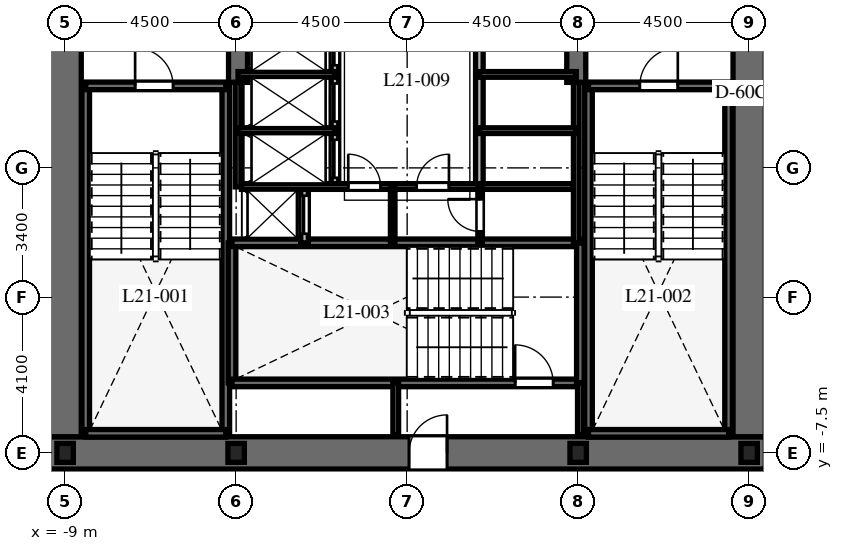
"""IFC4 building model, lengths in metres.
Left out: names, types, materials, properties, quantities, classifications, styles, units other than length and angle.
Written with IfcOpenShell. Run it as: python <this file> out.ifc"""

import sys

from ifc_helpers import new_model, si_unit, direction, frame, frame_2d, origin, origin_2d, place, context, subcontext, project, spatial, rectangle, i_section, extrude, element, fill, save


model = new_model("IFC4")
c1 = context("Model", 3, precision=1e-05, world=origin(), true_north=direction((0.0, 1.0)))
c2 = subcontext(c1, "Body", "Model", "MODEL_VIEW")
j1 = project(units=[si_unit("LENGTHUNIT", "METRE"), si_unit("PLANEANGLEUNIT", "RADIAN")], contexts=[c1])
p1 = place(None, origin())
s1 = spatial("IfcSite", under=j1, at=p1, CompositionType="ELEMENT")
p2 = place(p1, origin())
s2 = spatial("IfcBuilding", under=s1, at=p2, CompositionType="ELEMENT")
p3 = place(p2, frame((0.0, 0.0, 91.4)))
s3 = spatial("IfcBuildingStorey", under=s2, at=p3, CompositionType="ELEMENT", Elevation=91.4)
p4 = place(p3, frame((-9.425, -7.5, 0.0), z_axis=(0.0, 0.0, 1.0), x_axis=(1.0, 0.0, 0.0)))
e1 = element("IfcWall", 1, at=p4, inside=s3, PredefinedType="SHEAR", context=c2, shape_type="SweptSolid", body=[
    extrude(rectangle(XDim=18.85, YDim=0.85, at=frame_2d((9.425, 0.0))), origin(), (0.0, 0.0, 1.0), 3.7),
])
p5 = place(p4, frame((9.475, 0.0, 0.0)))
e2 = element("IfcOpeningElement", 2, at=p5, cuts=e1, PredefinedType="OPENING", context=c2, shape_type="SweptSolid", body=[
    extrude(rectangle(XDim=1.0, YDim=2.15, at=frame_2d((0.5, 1.075))), frame((0.0, 0.435, 0.0), z_axis=(0.0, -1.0, 0.0), x_axis=(1.0, 0.0, 0.0)), (0.0, 0.0, 1.0), 0.87),
])
p6 = place(p3, frame((-9.0, -7.075, 0.0), z_axis=(0.0, 0.0, 1.0), x_axis=(0.0, 1.0, 0.0)))
e3 = element("IfcWall", 3, at=p6, inside=s3, PredefinedType="SHEAR", context=c2, shape_type="SweptSolid", body=[
    extrude(rectangle(XDim=14.15, YDim=0.85, at=frame_2d((7.075, 0.0))), origin(), (0.0, 0.0, 1.0), 3.7),
])
p7 = place(p6, frame((10.2, 0.0, 0.0)))
e4 = element("IfcOpeningElement", 4, at=p7, cuts=e3, PredefinedType="OPENING", context=c2, shape_type="SweptSolid", body=[
    extrude(rectangle(XDim=1.05, YDim=2.15, at=frame_2d((0.525, 1.075))), frame((0.0, 0.435, 0.0), z_axis=(0.0, -1.0, 0.0), x_axis=(1.0, 0.0, 0.0)), (0.0, 0.0, 1.0), 0.87),
])
p8 = place(p3, frame((9.0, -7.075, 0.0), z_axis=(0.0, 0.0, 1.0), x_axis=(0.0, 1.0, 0.0)))
e5 = element("IfcWall", 5, at=p8, inside=s3, PredefinedType="SHEAR", context=c2, shape_type="SweptSolid", body=[
    extrude(rectangle(XDim=14.15, YDim=0.85, at=frame_2d((7.075, 0.0))), origin(), (0.0, 0.0, 1.0), 3.7),
])
p9 = place(p8, frame((10.2, 0.0, 0.0)))
e6 = element("IfcOpeningElement", 6, at=p9, cuts=e5, PredefinedType="OPENING", context=c2, shape_type="SweptSolid", body=[
    extrude(rectangle(XDim=1.05, YDim=2.15, at=frame_2d((0.525, 1.075))), frame((0.0, 0.435, 0.0), z_axis=(0.0, -1.0, 0.0), x_axis=(1.0, 0.0, 0.0)), (0.0, 0.0, 1.0), 0.87),
])
for number, where, z_axis, x_axis in (
    (7, (-4.45, 2.25, 0.0), (0.0, 0.0, 1.0), (0.0, 1.0, 0.0)),
    (8, (4.45, 2.25, 0.0), (0.0, 0.0, 1.0), (0.0, 1.0, 0.0)),
):
    element("IfcWall", number, at=place(p3, frame(where, z_axis=z_axis, x_axis=x_axis)), inside=s3, PredefinedType="SHEAR", context=c2, shape_type="SweptSolid", body=[
        extrude(rectangle(XDim=4.825, YDim=0.5, at=frame_2d((2.413, 0.0))), origin(), (0.0, 0.0, 1.0), 3.7),
    ])
for number, where, z_axis, x_axis in (
    (9, (-8.458, -6.985, 0.0), (0.0, 0.0, 1.0), (0.0, 1.0, 0.0)),
    (10, (-4.772, -6.985, 0.0), (0.0, 0.0, 1.0), (0.0, 1.0, 0.0)),
):
    element("IfcWall", number, at=place(p3, frame(where, z_axis=z_axis, x_axis=x_axis)), inside=s3, PredefinedType="SHEAR", context=c2, shape_type="SweptSolid", body=[
        extrude(rectangle(XDim=9.143, YDim=0.2, at=frame_2d((4.572, 0.0))), origin(), (0.0, 0.0, 1.0), 3.7),
    ])
p10 = place(p3, frame((-8.458, -6.985, 0.0), z_axis=(0.0, 0.0, 1.0), x_axis=(1.0, 0.0, 0.0)))
e11 = element("IfcWall", 11, at=p10, inside=s3, PredefinedType="SHEAR", context=c2, shape_type="SweptSolid", body=[
    extrude(rectangle(XDim=3.686, YDim=0.2, at=frame_2d((1.843, 0.0))), origin(), (0.0, 0.0, 1.0), 3.7),
])
p11 = place(p3, frame((-8.458, 2.158, 0.0), z_axis=(0.0, 0.0, 1.0), x_axis=(1.0, 0.0, 0.0)))
e12 = element("IfcWall", 12, at=p11, inside=s3, PredefinedType="SHEAR", context=c2, shape_type="SweptSolid", body=[
    extrude(rectangle(XDim=3.686, YDim=0.2, at=frame_2d((1.843, 0.0))), origin(), (0.0, 0.0, 1.0), 3.7),
])
p12 = place(p11, frame((1.3, 0.0, 0.0)))
e13 = element("IfcOpeningElement", 13, at=p12, cuts=e12, PredefinedType="OPENING", context=c2, shape_type="SweptSolid", body=[
    extrude(rectangle(XDim=1.0, YDim=2.15, at=frame_2d((0.5, 1.075))), frame((0.0, 0.11, 0.0), z_axis=(0.0, -1.0, 0.0), x_axis=(1.0, 0.0, 0.0)), (0.0, 0.0, 1.0), 0.22),
])
for number, where, z_axis, x_axis in (
    (14, (4.772, -6.985, 0.0), (0.0, 0.0, 1.0), (0.0, 1.0, 0.0)),
    (15, (8.458, -6.985, 0.0), (0.0, 0.0, 1.0), (0.0, 1.0, 0.0)),
):
    element("IfcWall", number, at=place(p3, frame(where, z_axis=z_axis, x_axis=x_axis)), inside=s3, PredefinedType="SHEAR", context=c2, shape_type="SweptSolid", body=[
        extrude(rectangle(XDim=9.143, YDim=0.2, at=frame_2d((4.572, 0.0))), origin(), (0.0, 0.0, 1.0), 3.7),
    ])
p13 = place(p3, frame((4.772, -6.985, 0.0), z_axis=(0.0, 0.0, 1.0), x_axis=(1.0, 0.0, 0.0)))
e16 = element("IfcWall", 16, at=p13, inside=s3, PredefinedType="SHEAR", context=c2, shape_type="SweptSolid", body=[
    extrude(rectangle(XDim=3.686, YDim=0.2, at=frame_2d((1.843, 0.0))), origin(), (0.0, 0.0, 1.0), 3.7),
])
p14 = place(p3, frame((4.772, 2.158, 0.0), z_axis=(0.0, 0.0, 1.0), x_axis=(1.0, 0.0, 0.0)))
e17 = element("IfcWall", 17, at=p14, inside=s3, PredefinedType="SHEAR", context=c2, shape_type="SweptSolid", body=[
    extrude(rectangle(XDim=3.686, YDim=0.2, at=frame_2d((1.843, 0.0))), origin(), (0.0, 0.0, 1.0), 3.7),
])
p15 = place(p14, frame((1.35, 0.0, 0.0)))
e18 = element("IfcOpeningElement", 18, at=p15, cuts=e17, PredefinedType="OPENING", context=c2, shape_type="SweptSolid", body=[
    extrude(rectangle(XDim=1.0, YDim=2.15, at=frame_2d((0.5, 1.075))), frame((0.0, 0.11, 0.0), z_axis=(0.0, -1.0, 0.0), x_axis=(1.0, 0.0, 0.0)), (0.0, 0.0, 1.0), 0.22),
])
p16 = place(p3, frame((-4.608, -5.658, 0.0), z_axis=(0.0, 0.0, 1.0), x_axis=(0.0, 1.0, 0.0)))
e19 = element("IfcWall", 19, at=p16, inside=s3, PredefinedType="SHEAR", context=c2, shape_type="SweptSolid", body=[
    extrude(rectangle(XDim=3.686, YDim=0.2, at=frame_2d((1.843, 0.0))), origin(), (0.0, 0.0, 1.0), 3.7),
])
p17 = place(p3, frame((-4.608, -5.658, 0.0), z_axis=(0.0, 0.0, 1.0), x_axis=(1.0, 0.0, 0.0)))
e20 = element("IfcWall", 20, at=p17, inside=s3, PredefinedType="SHEAR", context=c2, shape_type="SweptSolid", body=[
    extrude(rectangle(XDim=9.166, YDim=0.2, at=frame_2d((4.583, 0.0))), origin(), (0.0, 0.0, 1.0), 3.7),
])
p18 = place(p17, frame((7.45, 0.0, 0.0)))
e21 = element("IfcOpeningElement", 21, at=p18, cuts=e20, PredefinedType="OPENING", context=c2, shape_type="SweptSolid", body=[
    extrude(rectangle(XDim=1.0, YDim=2.15, at=frame_2d((0.5, 1.075))), frame((0.0, 0.11, 0.0), z_axis=(0.0, -1.0, 0.0), x_axis=(1.0, 0.0, 0.0)), (0.0, 0.0, 1.0), 0.22),
])
p19 = place(p3, frame((-4.608, -1.972, 0.0), z_axis=(0.0, 0.0, 1.0), x_axis=(1.0, 0.0, 0.0)))
e22 = element("IfcWall", 22, at=p19, inside=s3, PredefinedType="SHEAR", context=c2, shape_type="SweptSolid", body=[
    extrude(rectangle(XDim=9.166, YDim=0.2, at=frame_2d((4.583, 0.0))), origin(), (0.0, 0.0, 1.0), 3.7),
])
p20 = place(p3, frame((4.558, -5.658, 0.0), z_axis=(0.0, 0.0, 1.0), x_axis=(0.0, 1.0, 0.0)))
e23 = element("IfcWall", 23, at=p20, inside=s3, PredefinedType="SHEAR", context=c2, shape_type="SweptSolid", body=[
    extrude(rectangle(XDim=3.686, YDim=0.2, at=frame_2d((1.843, 0.0))), origin(), (0.0, 0.0, 1.0), 3.7),
])
for number, where, z_axis, x_axis in (
    (24, (-9.0, -7.5, 0.0), (0.0, 0.0, 1.0), (1.0, 0.0, 0.0)),
    (25, (-4.5, -7.5, 0.0), (0.0, 0.0, 1.0), (1.0, 0.0, 0.0)),
    (26, (4.5, -7.5, 0.0), (0.0, 0.0, 1.0), (1.0, 0.0, 0.0)),
    (27, (9.0, -7.5, 0.0), (0.0, 0.0, 1.0), (1.0, 0.0, 0.0)),
):
    element("IfcColumn", number, at=place(p3, frame(where, z_axis=z_axis, x_axis=x_axis)), inside=s3, PredefinedType="COLUMN", context=c2, shape_type="SweptSolid", body=[
        extrude(i_section(OverallWidth=0.432, OverallDepth=0.498, WebThickness=0.056, FlangeThickness=0.089, at=origin_2d()), origin(), (0.0, 0.0, 1.0), 3.7),
    ])
for number, where, z_axis, x_axis in (
    (28, (-0.3, -7.02, 0.0), (0.0, 0.0, 1.0), (0.0, 1.0, 0.0)),
    (29, (4.558, -7.02, 0.0), (0.0, 0.0, 1.0), (0.0, 1.0, 0.0)),
):
    element("IfcWall", number, at=place(p3, frame(where, z_axis=z_axis, x_axis=x_axis)), inside=s3, PredefinedType="PARTITIONING", context=c2, shape_type="SweptSolid", body=[
        extrude(rectangle(XDim=1.362, YDim=0.15, at=frame_2d((0.681, 0.0))), origin(), (0.0, 0.0, 1.0), 3.4),
    ])
p21 = place(p3, frame((-2.7, -1.972, 0.0), z_axis=(0.0, 0.0, 1.0), x_axis=(0.0, 1.0, 0.0)))
e30 = element("IfcWall", 30, at=p21, inside=s3, PredefinedType="PARTITIONING", context=c2, shape_type="SweptSolid", body=[
    extrude(rectangle(XDim=1.472, YDim=0.2, at=frame_2d((0.736, 0.0))), origin(), (0.0, 0.0, 1.0), 3.4),
])
p22 = place(p21, frame((0.24, 0.0, 0.0)))
e31 = element("IfcOpeningElement", 31, at=p22, cuts=e30, PredefinedType="OPENING", context=c2, shape_type="SweptSolid", body=[
    extrude(rectangle(XDim=1.0, YDim=2.2, at=frame_2d((0.5, 1.1))), frame((0.0, 0.11, 0.0), z_axis=(0.0, -1.0, 0.0), x_axis=(1.0, 0.0, 0.0)), (0.0, 0.0, 1.0), 0.22),
])
p23 = place(p3, frame((-4.45, -0.5, 0.0), z_axis=(0.0, 0.0, 1.0), x_axis=(0.0, 1.0, 0.0)))
e32 = element("IfcWall", 32, at=p23, inside=s3, PredefinedType="PARTITIONING", context=c2, shape_type="SweptSolid", body=[
    extrude(rectangle(XDim=2.75, YDim=0.15, at=frame_2d((1.375, 0.0))), origin(), (0.0, 0.0, 1.0), 3.4),
])
p24 = place(p3, frame((4.45, -1.972, 0.0), z_axis=(0.0, 0.0, 1.0), x_axis=(0.0, 1.0, 0.0)))
e33 = element("IfcWall", 33, at=p24, inside=s3, PredefinedType="PARTITIONING", context=c2, shape_type="SweptSolid", body=[
    extrude(rectangle(XDim=4.222, YDim=0.15, at=frame_2d((2.111, 0.0))), origin(), (0.0, 0.0, 1.0), 3.4),
])
p25 = place(p3, frame((-1.9, -0.5, 0.0), z_axis=(0.0, 0.0, 1.0), x_axis=(0.0, 1.0, 0.0)))
e34 = element("IfcWall", 34, at=p25, inside=s3, PredefinedType="PARTITIONING", context=c2, shape_type="SweptSolid", body=[
    extrude(rectangle(XDim=4.44, YDim=0.2, at=frame_2d((2.22, 0.0))), origin(), (0.0, 0.0, 1.0), 3.4),
])
p26 = place(p25, frame((0.24, 0.0, 0.0)))
e35 = element("IfcOpeningElement", 35, at=p26, cuts=e34, PredefinedType="OPENING", context=c2, shape_type="SweptSolid", body=[
    extrude(rectangle(XDim=1.0, YDim=2.2, at=frame_2d((0.5, 1.1))), frame((0.0, 0.11, 0.0), z_axis=(0.0, -1.0, 0.0), x_axis=(1.0, 0.0, 0.0)), (0.0, 0.0, 1.0), 0.22),
])
p27 = place(p25, frame((1.72, 0.0, 0.0)))
e36 = element("IfcOpeningElement", 36, at=p27, cuts=e34, PredefinedType="OPENING", context=c2, shape_type="SweptSolid", body=[
    extrude(rectangle(XDim=1.0, YDim=2.2, at=frame_2d((0.5, 1.1))), frame((0.0, 0.11, 0.0), z_axis=(0.0, -1.0, 0.0), x_axis=(1.0, 0.0, 0.0)), (0.0, 0.0, 1.0), 0.22),
])
p28 = place(p25, frame((3.2, 0.0, 0.0)))
e37 = element("IfcOpeningElement", 37, at=p28, cuts=e34, PredefinedType="OPENING", context=c2, shape_type="SweptSolid", body=[
    extrude(rectangle(XDim=1.0, YDim=2.2, at=frame_2d((0.5, 1.1))), frame((0.0, 0.11, 0.0), z_axis=(0.0, -1.0, 0.0), x_axis=(1.0, 0.0, 0.0)), (0.0, 0.0, 1.0), 0.22),
])
for number, where, z_axis, x_axis in (
    (38, (-4.45, 0.98, 0.0), (0.0, 0.0, 1.0), (1.0, 0.0, 0.0)),
    (39, (-4.45, 2.46, 0.0), (0.0, 0.0, 1.0), (1.0, 0.0, 0.0)),
):
    element("IfcWall", number, at=place(p3, frame(where, z_axis=z_axis, x_axis=x_axis)), inside=s3, PredefinedType="PARTITIONING", context=c2, shape_type="SweptSolid", body=[
        extrude(rectangle(XDim=2.55, YDim=0.15, at=frame_2d((1.275, 0.0))), origin(), (0.0, 0.0, 1.0), 3.4),
    ])
p29 = place(p3, frame((1.9, -0.5, 0.0), z_axis=(0.0, 0.0, 1.0), x_axis=(0.0, 1.0, 0.0)))
e40 = element("IfcWall", 40, at=p29, inside=s3, PredefinedType="PARTITIONING", context=c2, shape_type="SweptSolid", body=[
    extrude(rectangle(XDim=4.44, YDim=0.2, at=frame_2d((2.22, 0.0))), origin(), (0.0, 0.0, 1.0), 3.4),
])
for number, where, z_axis, x_axis in (
    (41, (1.9, 0.98, 0.0), (0.0, 0.0, 1.0), (1.0, 0.0, 0.0)),
    (42, (1.9, 2.46, 0.0), (0.0, 0.0, 1.0), (1.0, 0.0, 0.0)),
):
    element("IfcWall", number, at=place(p3, frame(where, z_axis=z_axis, x_axis=x_axis)), inside=s3, PredefinedType="PARTITIONING", context=c2, shape_type="SweptSolid", body=[
        extrude(rectangle(XDim=2.55, YDim=0.15, at=frame_2d((1.275, 0.0))), origin(), (0.0, 0.0, 1.0), 3.4),
    ])
p30 = place(p3, frame((-4.36, -0.49, 0.0), z_axis=(0.0, 0.0, 1.0), x_axis=(1.0, 0.0, 0.0)))
e43 = element("IfcWall", 43, at=p30, inside=s3, PredefinedType="PARTITIONING", context=c2, shape_type="SweptSolid", body=[
    extrude(rectangle(XDim=8.72, YDim=0.15, at=frame_2d((4.36, 0.0))), origin(), (0.0, 0.0, 1.0), 3.4),
])
p31 = place(p30, frame((2.81, 0.0, 0.0)))
e44 = element("IfcOpeningElement", 44, at=p31, cuts=e43, PredefinedType="OPENING", context=c2, shape_type="SweptSolid", body=[
    extrude(rectangle(XDim=0.85, YDim=2.03, at=frame_2d((0.425, 1.015))), frame((0.0, 0.085, 0.0), z_axis=(0.0, -1.0, 0.0), x_axis=(1.0, 0.0, 0.0)), (0.0, 0.0, 1.0), 0.17),
])
p32 = place(p30, frame((4.61, 0.0, 0.0)))
e45 = element("IfcOpeningElement", 45, at=p32, cuts=e43, PredefinedType="OPENING", context=c2, shape_type="SweptSolid", body=[
    extrude(rectangle(XDim=0.85, YDim=2.03, at=frame_2d((0.425, 1.015))), frame((0.0, 0.085, 0.0), z_axis=(0.0, -1.0, 0.0), x_axis=(1.0, 0.0, 0.0)), (0.0, 0.0, 1.0), 0.17),
])
p33 = place(p3, frame((-0.38, -1.972, 0.0), z_axis=(0.0, 0.0, 1.0), x_axis=(0.0, 1.0, 0.0)))
e46 = element("IfcWall", 46, at=p33, inside=s3, PredefinedType="PARTITIONING", context=c2, shape_type="SweptSolid", body=[
    extrude(rectangle(XDim=1.472, YDim=0.12, at=frame_2d((0.736, 0.0))), origin(), (0.0, 0.0, 1.0), 3.4),
])
p34 = place(p3, frame((1.92, -1.972, 0.0), z_axis=(0.0, 0.0, 1.0), x_axis=(0.0, 1.0, 0.0)))
e47 = element("IfcWall", 47, at=p34, inside=s3, PredefinedType="PARTITIONING", context=c2, shape_type="SweptSolid", body=[
    extrude(rectangle(XDim=1.472, YDim=0.12, at=frame_2d((0.736, 0.0))), origin(), (0.0, 0.0, 1.0), 3.4),
])
p35 = place(p34, frame((0.3, 0.0, 0.0)))
e48 = element("IfcOpeningElement", 48, at=p35, cuts=e47, PredefinedType="OPENING", context=c2, shape_type="SweptSolid", body=[
    extrude(rectangle(XDim=0.85, YDim=2.03, at=frame_2d((0.425, 1.015))), frame((0.0, 0.07, 0.0), z_axis=(0.0, -1.0, 0.0), x_axis=(1.0, 0.0, 0.0)), (0.0, 0.0, 1.0), 0.14),
])
p36 = place(p12, origin())
e49 = element("IfcDoor", 49, at=p36, inside=s3, OperationType="SINGLE_SWING_LEFT", PredefinedType="DOOR", context=c2, shape_type="SweptSolid", body=[
    extrude(rectangle(XDim=1.0, YDim=2.15, at=frame_2d((0.5, 1.075))), frame((0.0, 0.025, 0.0), z_axis=(0.0, -1.0, 0.0), x_axis=(1.0, 0.0, 0.0)), (0.0, 0.0, 1.0), 0.05),
])
fill(e13, e49)
p37 = place(p15, origin())
e50 = element("IfcDoor", 50, at=p37, inside=s3, OperationType="SINGLE_SWING_RIGHT", PredefinedType="DOOR", context=c2, shape_type="SweptSolid", body=[
    extrude(rectangle(XDim=1.0, YDim=2.15, at=frame_2d((0.5, 1.075))), frame((0.0, 0.025, 0.0), z_axis=(0.0, -1.0, 0.0), x_axis=(1.0, 0.0, 0.0)), (0.0, 0.0, 1.0), 0.05),
])
fill(e18, e50)
p38 = place(p18, origin())
e51 = element("IfcDoor", 51, at=p38, inside=s3, OperationType="SINGLE_SWING_LEFT", PredefinedType="DOOR", context=c2, shape_type="SweptSolid", body=[
    extrude(rectangle(XDim=1.0, YDim=2.15, at=frame_2d((0.5, 1.075))), frame((0.0, 0.025, 0.0), z_axis=(0.0, -1.0, 0.0), x_axis=(1.0, 0.0, 0.0)), (0.0, 0.0, 1.0), 0.05),
])
fill(e21, e51)
p39 = place(p5, origin())
e52 = element("IfcDoor", 52, at=p39, inside=s3, OperationType="SINGLE_SWING_RIGHT", PredefinedType="DOOR", context=c2, shape_type="SweptSolid", body=[
    extrude(rectangle(XDim=1.0, YDim=2.15, at=frame_2d((0.5, 1.075))), frame((0.0, 0.025, 0.0), z_axis=(0.0, -1.0, 0.0), x_axis=(1.0, 0.0, 0.0)), (0.0, 0.0, 1.0), 0.05),
])
fill(e2, e52)
p40 = place(p22, origin())
e53 = element("IfcDoor", 53, at=p40, inside=s3, OperationType="SLIDING_TO_LEFT", PredefinedType="DOOR", context=c2, shape_type="SweptSolid", body=[
    extrude(rectangle(XDim=1.0, YDim=2.2, at=frame_2d((0.5, 1.1))), frame((0.0, 0.025, 0.0), z_axis=(0.0, -1.0, 0.0), x_axis=(1.0, 0.0, 0.0)), (0.0, 0.0, 1.0), 0.05),
])
fill(e31, e53)
p41 = place(p26, origin())
e54 = element("IfcDoor", 54, at=p41, inside=s3, OperationType="SLIDING_TO_LEFT", PredefinedType="DOOR", context=c2, shape_type="SweptSolid", body=[
    extrude(rectangle(XDim=1.0, YDim=2.2, at=frame_2d((0.5, 1.1))), frame((0.0, 0.025, 0.0), z_axis=(0.0, -1.0, 0.0), x_axis=(1.0, 0.0, 0.0)), (0.0, 0.0, 1.0), 0.05),
])
fill(e35, e54)
p42 = place(p27, origin())
e55 = element("IfcDoor", 55, at=p42, inside=s3, OperationType="SLIDING_TO_LEFT", PredefinedType="DOOR", context=c2, shape_type="SweptSolid", body=[
    extrude(rectangle(XDim=1.0, YDim=2.2, at=frame_2d((0.5, 1.1))), frame((0.0, 0.025, 0.0), z_axis=(0.0, -1.0, 0.0), x_axis=(1.0, 0.0, 0.0)), (0.0, 0.0, 1.0), 0.05),
])
fill(e36, e55)
p43 = place(p28, origin())
e56 = element("IfcDoor", 56, at=p43, inside=s3, OperationType="SLIDING_TO_LEFT", PredefinedType="DOOR", context=c2, shape_type="SweptSolid", body=[
    extrude(rectangle(XDim=1.0, YDim=2.2, at=frame_2d((0.5, 1.1))), frame((0.0, 0.025, 0.0), z_axis=(0.0, -1.0, 0.0), x_axis=(1.0, 0.0, 0.0)), (0.0, 0.0, 1.0), 0.05),
])
fill(e37, e56)
p44 = place(p31, origin())
e57 = element("IfcDoor", 57, at=p44, inside=s3, OperationType="SINGLE_SWING_LEFT", PredefinedType="DOOR", context=c2, shape_type="SweptSolid", body=[
    extrude(rectangle(XDim=0.85, YDim=2.03, at=frame_2d((0.425, 1.015))), frame((0.0, 0.025, 0.0), z_axis=(0.0, -1.0, 0.0), x_axis=(1.0, 0.0, 0.0)), (0.0, 0.0, 1.0), 0.05),
])
fill(e44, e57)
p45 = place(p32, origin())
e58 = element("IfcDoor", 58, at=p45, inside=s3, OperationType="SINGLE_SWING_RIGHT", PredefinedType="DOOR", context=c2, shape_type="SweptSolid", body=[
    extrude(rectangle(XDim=0.85, YDim=2.03, at=frame_2d((0.425, 1.015))), frame((0.0, 0.025, 0.0), z_axis=(0.0, -1.0, 0.0), x_axis=(1.0, 0.0, 0.0)), (0.0, 0.0, 1.0), 0.05),
])
fill(e45, e58)
p46 = place(p35, origin())
e59 = element("IfcDoor", 59, at=p46, inside=s3, OperationType="SINGLE_SWING_RIGHT", PredefinedType="DOOR", context=c2, shape_type="SweptSolid", body=[
    extrude(rectangle(XDim=0.85, YDim=2.03, at=frame_2d((0.425, 1.015))), frame((0.0, 0.025, 0.0), z_axis=(0.0, -1.0, 0.0), x_axis=(1.0, 0.0, 0.0)), (0.0, 0.0, 1.0), 0.05),
])
fill(e48, e59)
save(model, sys.argv[1])
